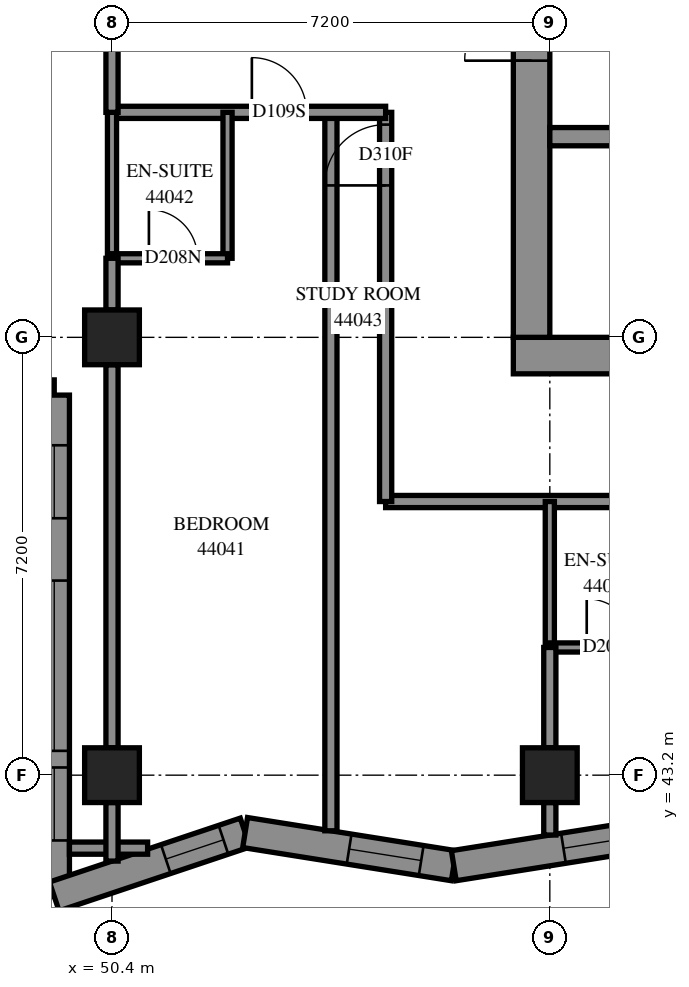
"""IFC4 building model, lengths in metres.
Left out: names, types, materials, properties, quantities, classifications, styles, units other than length and angle.
Written with IfcOpenShell. Run it as: python <this file> out.ifc"""

import sys

from ifc_helpers import new_model, si_unit, direction, frame, frame_2d, origin, origin_2d, place, context, subcontext, project, spatial, polyline, rectangle, outline, extrude, element, fill, save


model = new_model("IFC4")
c1 = context("Model", 3, precision=1e-05, world=origin(), true_north=direction((0.0, 1.0)))
c2 = subcontext(c1, "Body", "Model", "MODEL_VIEW")
j1 = project(units=[si_unit("LENGTHUNIT", "METRE"), si_unit("PLANEANGLEUNIT", "RADIAN")], contexts=[c1])
p1 = place(None, origin())
s1 = spatial("IfcSite", under=j1, at=p1, CompositionType="ELEMENT")
p2 = place(p1, origin())
s2 = spatial("IfcBuilding", under=s1, at=p2, CompositionType="ELEMENT")
p3 = place(p2, frame((0.0, 0.0, 162.6)))
s3 = spatial("IfcBuildingStorey", under=s2, at=p3, CompositionType="ELEMENT", Elevation=162.6)
for number, where, z_axis, x_axis in (
    (1, (50.4, 43.2, 0.0), (0.0, 0.0, 1.0), (1.0, 0.0, 0.0)),
    (2, (50.4, 50.4, 0.0), (0.0, 0.0, 1.0), (1.0, 0.0, 0.0)),
    (3, (57.6, 43.2, 0.0), (0.0, 0.0, 1.0), (1.0, 0.0, 0.0)),
):
    element("IfcColumn", number, at=place(p3, frame(where, z_axis=z_axis, x_axis=x_axis)), inside=s3, PredefinedType="COLUMN", context=c2, shape_type="SweptSolid", body=[
        extrude(rectangle(XDim=0.9, YDim=0.9, at=origin_2d()), origin(), (0.0, 0.0, 1.0), 3.1),
    ])
p4 = place(p3, frame((57.0, 50.1, -0.3), z_axis=(0.0, 0.0, 1.0), x_axis=(1.0, 0.0, 0.0)))
e4 = element("IfcWall", 4, at=p4, inside=s3, PredefinedType="SHEAR", context=c2, shape_type="SweptSolid", body=[
    extrude(rectangle(XDim=15.6, YDim=0.6, at=frame_2d((7.8, 0.0))), origin(), (0.0, 0.0, 1.0), 2.7),
])
p5 = place(p3, frame((57.3, 50.4, -0.3), z_axis=(0.0, 0.0, 1.0), x_axis=(0.0, 1.0, 0.0)))
e5 = element("IfcWall", 5, at=p5, inside=s3, PredefinedType="SHEAR", context=c2, shape_type="SweptSolid", body=[
    extrude(rectangle(XDim=14.4, YDim=0.6, at=frame_2d((7.2, 0.0))), origin(), (0.0, 0.0, 1.0), 2.7),
])
p6 = place(p5, frame((4.55, 0.0, 0.3)))
e6 = element("IfcOpeningElement", 6, at=p6, cuts=e5, PredefinedType="OPENING", context=c2, shape_type="SweptSolid", body=[
    extrude(rectangle(XDim=1.1, YDim=2.1, at=frame_2d((0.55, 1.05))), frame((0.0, 0.31, 0.0), z_axis=(0.0, -1.0, 0.0), x_axis=(1.0, 0.0, 0.0)), (0.0, 0.0, 1.0), 0.62),
])
p7 = place(p5, frame((11.35, 0.0, 0.3)))
e7 = element("IfcOpeningElement", 7, at=p7, cuts=e5, PredefinedType="OPENING", context=c2, shape_type="SweptSolid", body=[
    extrude(rectangle(XDim=1.1, YDim=2.1, at=frame_2d((0.55, 1.05))), frame((0.0, 0.31, 0.0), z_axis=(0.0, -1.0, 0.0), x_axis=(1.0, 0.0, 0.0)), (0.0, 0.0, 1.0), 0.62),
])
p8 = place(p3, frame((57.6, 53.7, 0.0), z_axis=(0.0, 0.0, 1.0), x_axis=(1.0, 0.0, 0.0)))
e8 = element("IfcWall", 8, at=p8, inside=s3, PredefinedType="SOLIDWALL", context=c2, shape_type="SweptSolid", body=[
    extrude(rectangle(XDim=14.4, YDim=0.3, at=frame_2d((7.2, 0.0))), origin(), (0.0, 0.0, 1.0), 3.1),
])
p9 = place(p8, frame((1.35, 0.0, 0.0)))
e9 = element("IfcOpeningElement", 9, at=p9, cuts=e8, PredefinedType="OPENING", context=c2, shape_type="SweptSolid", body=[
    extrude(rectangle(XDim=0.9, YDim=2.1, at=frame_2d((0.45, 1.05))), frame((0.0, 0.16, 0.0), z_axis=(0.0, -1.0, 0.0), x_axis=(1.0, 0.0, 0.0)), (0.0, 0.0, 1.0), 0.32),
])
p10 = place(p8, frame((4.95, 0.0, 0.0)))
e10 = element("IfcOpeningElement", 10, at=p10, cuts=e8, PredefinedType="OPENING", context=c2, shape_type="SweptSolid", body=[
    extrude(rectangle(XDim=0.9, YDim=2.1, at=frame_2d((0.45, 1.05))), frame((0.0, 0.16, 0.0), z_axis=(0.0, -1.0, 0.0), x_axis=(1.0, 0.0, 0.0)), (0.0, 0.0, 1.0), 0.32),
])
p11 = place(p8, frame((8.55, 0.0, 0.0)))
e11 = element("IfcOpeningElement", 11, at=p11, cuts=e8, PredefinedType="OPENING", context=c2, shape_type="SweptSolid", body=[
    extrude(rectangle(XDim=0.9, YDim=2.1, at=frame_2d((0.45, 1.05))), frame((0.0, 0.16, 0.0), z_axis=(0.0, -1.0, 0.0), x_axis=(1.0, 0.0, 0.0)), (0.0, 0.0, 1.0), 0.32),
])
p12 = place(p8, frame((12.05, 0.0, 0.0)))
e12 = element("IfcOpeningElement", 12, at=p12, cuts=e8, PredefinedType="OPENING", context=c2, shape_type="SweptSolid", body=[
    extrude(rectangle(XDim=1.1, YDim=2.1, at=frame_2d((0.55, 1.05))), frame((0.0, 0.16, 0.0), z_axis=(0.0, -1.0, 0.0), x_axis=(1.0, 0.0, 0.0)), (0.0, 0.0, 1.0), 0.32),
])
p13 = place(p3, frame((42.25, 49.45, 0.0), z_axis=(0.0, 0.0, 1.0), x_axis=(1.0, 0.0, 0.0)))
e13 = element("IfcWall", 13, at=p13, inside=s3, PredefinedType="SOLIDWALL", context=c2, shape_type="SweptSolid", body=[
    extrude(outline(polyline([(-0.25, -0.25), (6.95, -0.25), (7.45, 0.25), (0.25, 0.25), (-0.25, -0.25)])), origin(), (0.0, 0.0, 1.0), 3.1),
])
p14 = place(p13, frame((1.35, 0.0, 0.45)))
e14 = element("IfcOpeningElement", 14, at=p14, cuts=e13, PredefinedType="OPENING", context=c2, shape_type="SweptSolid", body=[
    extrude(rectangle(XDim=2.8, YDim=2.5, at=frame_2d((1.4, 1.25))), frame((0.0, 0.26, 0.0), z_axis=(0.0, -1.0, 0.0), x_axis=(1.0, 0.0, 0.0)), (0.0, 0.0, 1.0), 0.52),
])
p15 = place(p13, frame((5.175, 0.0, 0.45)))
e15 = element("IfcOpeningElement", 15, at=p15, cuts=e13, PredefinedType="OPENING", context=c2, shape_type="SweptSolid", body=[
    extrude(rectangle(XDim=1.2, YDim=2.5, at=frame_2d((0.6, 1.25))), frame((0.0, 0.26, 0.0), z_axis=(0.0, -1.0, 0.0), x_axis=(1.0, 0.0, 0.0)), (0.0, 0.0, 1.0), 0.52),
])
p16 = place(p3, frame((49.45, 49.45, 0.0), z_axis=(0.0, 0.0, 1.0), x_axis=(0.0, -1.0, 0.0)))
e16 = element("IfcWall", 16, at=p16, inside=s3, PredefinedType="SOLIDWALL", context=c2, shape_type="SweptSolid", body=[
    extrude(outline(polyline([(0.25, -0.25), (8.592, -0.25), (7.897, 0.25), (-0.25, 0.25), (0.25, -0.25)])), origin(), (0.0, 0.0, 1.0), 3.1),
])
p17 = place(p16, frame((3.05, 0.0, 0.45)))
e17 = element("IfcOpeningElement", 17, at=p17, cuts=e16, PredefinedType="OPENING", context=c2, shape_type="SweptSolid", body=[
    extrude(rectangle(XDim=2.8, YDim=2.5, at=frame_2d((1.4, 1.25))), frame((0.0, 0.26, 0.0), z_axis=(0.0, -1.0, 0.0), x_axis=(1.0, 0.0, 0.0)), (0.0, 0.0, 1.0), 0.52),
])
p18 = place(p16, frame((0.825, 0.0, 0.45)))
e18 = element("IfcOpeningElement", 18, at=p18, cuts=e16, PredefinedType="OPENING", context=c2, shape_type="SweptSolid", body=[
    extrude(rectangle(XDim=1.2, YDim=2.5, at=frame_2d((0.6, 1.25))), frame((0.0, 0.26, 0.0), z_axis=(0.0, -1.0, 0.0), x_axis=(1.0, 0.0, 0.0)), (0.0, 0.0, 1.0), 0.52),
])
p19 = place(p16, frame((6.124, 0.0, 0.45)))
e19 = element("IfcOpeningElement", 19, at=p19, cuts=e16, PredefinedType="OPENING", context=c2, shape_type="SweptSolid", body=[
    extrude(rectangle(XDim=1.2, YDim=2.5, at=frame_2d((0.6, 1.25))), frame((0.0, 0.26, 0.0), z_axis=(0.0, -1.0, 0.0), x_axis=(1.0, 0.0, 0.0)), (0.0, 0.0, 1.0), 0.52),
])
p20 = place(p3, frame((49.45, 41.205, 0.0), z_axis=(0.0, 0.0, 1.0), x_axis=(0.9482534743, 0.3175143279, 0.0)))
e20 = element("IfcWall", 20, at=p20, inside=s3, PredefinedType="SOLIDWALL", context=c2, shape_type="SweptSolid", body=[
    extrude(outline(polyline([(-0.347, -0.25), (3.249, -0.25), (3.372, 0.25), (0.347, 0.25), (-0.347, -0.25)])), origin(), (0.0, 0.0, 1.0), 3.1),
])
p21 = place(p20, frame((1.935, 0.0, 0.45)))
e21 = element("IfcOpeningElement", 21, at=p21, cuts=e20, PredefinedType="OPENING", context=c2, shape_type="SweptSolid", body=[
    extrude(rectangle(XDim=1.0, YDim=2.5, at=frame_2d((0.5, 1.25))), frame((0.0, 0.26, 0.0), z_axis=(0.0, -1.0, 0.0), x_axis=(1.0, 0.0, 0.0)), (0.0, 0.0, 1.0), 0.52),
])
p22 = place(p3, frame((52.589, 42.257, 0.0), z_axis=(0.0, 0.0, 1.0), x_axis=(0.9876042465, -0.1569644935, 0.0)))
e22 = element("IfcWall", 22, at=p22, inside=s3, PredefinedType="SOLIDWALL", context=c2, shape_type="SweptSolid", body=[
    extrude(outline(polyline([(0.061, -0.25), (3.514, -0.25), (3.435, 0.25), (-0.061, 0.25), (0.061, -0.25)])), origin(), (0.0, 0.0, 1.0), 3.1),
])
p23 = place(p22, frame((1.732, 0.0, 0.45)))
e23 = element("IfcOpeningElement", 23, at=p23, cuts=e22, PredefinedType="OPENING", context=c2, shape_type="SweptSolid", body=[
    extrude(rectangle(XDim=1.2, YDim=2.5, at=frame_2d((0.6, 1.25))), frame((0.0, 0.26, 0.0), z_axis=(0.0, -1.0, 0.0), x_axis=(1.0, 0.0, 0.0)), (0.0, 0.0, 1.0), 0.52),
])
p24 = place(p3, frame((56.021, 41.711, 0.0), z_axis=(0.0, 0.0, 1.0), x_axis=(0.9876056196, 0.1569558544, 0.0)))
e24 = element("IfcWall", 24, at=p24, inside=s3, PredefinedType="SOLIDWALL", context=c2, shape_type="SweptSolid", body=[
    extrude(outline(polyline([(-0.04, -0.25), (3.413, -0.25), (3.493, 0.25), (0.04, 0.25), (-0.04, -0.25)])), origin(), (0.0, 0.0, 1.0), 3.1),
])
p25 = place(p24, frame((1.826, 0.0, 0.45)))
e25 = element("IfcOpeningElement", 25, at=p25, cuts=e24, PredefinedType="OPENING", context=c2, shape_type="SweptSolid", body=[
    extrude(rectangle(XDim=1.2, YDim=2.5, at=frame_2d((0.6, 1.25))), frame((0.0, 0.26, 0.0), z_axis=(0.0, -1.0, 0.0), x_axis=(1.0, 0.0, 0.0)), (0.0, 0.0, 1.0), 0.52),
])
p26 = place(p3, frame((54.9, 47.7, 0.0), z_axis=(0.0, 0.0, 1.0), x_axis=(1.0, 0.0, 0.0)))
e26 = element("IfcWall", 26, at=p26, inside=s3, PredefinedType="PARTITIONING", context=c2, shape_type="SweptSolid", body=[
    extrude(rectangle(XDim=19.326, YDim=0.2, at=frame_2d((9.663, 0.0))), origin(), (0.0, 0.0, 1.0), 3.1),
])
p27 = place(p26, frame((6.599, 0.0, 0.0)))
e27 = element("IfcOpeningElement", 27, at=p27, cuts=e26, PredefinedType="OPENING", context=c2, shape_type="SweptSolid", body=[
    extrude(rectangle(XDim=0.9, YDim=2.1, at=frame_2d((0.45, 1.05))), frame((0.0, 0.11, 0.0), z_axis=(0.0, -1.0, 0.0), x_axis=(1.0, 0.0, 0.0)), (0.0, 0.0, 1.0), 0.22),
])
p28 = place(p26, frame((13.799, 0.0, 0.0)))
e28 = element("IfcOpeningElement", 28, at=p28, cuts=e26, PredefinedType="OPENING", context=c2, shape_type="SweptSolid", body=[
    extrude(rectangle(XDim=0.9, YDim=2.1, at=frame_2d((0.45, 1.05))), frame((0.0, 0.11, 0.0), z_axis=(0.0, -1.0, 0.0), x_axis=(1.0, 0.0, 0.0)), (0.0, 0.0, 1.0), 0.22),
])
p29 = place(p3, frame((54.0, 42.285, 0.0), z_axis=(0.0, 0.0, 1.0), x_axis=(0.0, 1.0, 0.0)))
e29 = element("IfcWall", 29, at=p29, inside=s3, PredefinedType="PARTITIONING", context=c2, shape_type="SweptSolid", body=[
    extrude(rectangle(XDim=11.815, YDim=0.2, at=frame_2d((5.907, 0.0))), origin(), (0.0, 0.0, 1.0), 3.1),
])
p30 = place(p3, frame((54.9, 47.7, 0.0), z_axis=(0.0, 0.0, 1.0), x_axis=(0.0, 1.0, 0.0)))
e30 = element("IfcWall", 30, at=p30, inside=s3, PredefinedType="PARTITIONING", context=c2, shape_type="SweptSolid", body=[
    extrude(rectangle(XDim=6.4, YDim=0.2, at=frame_2d((3.2, 0.0))), origin(), (0.0, 0.0, 1.0), 3.1),
])
p31 = place(p30, frame((5.199, 0.0, 0.0)))
e31 = element("IfcOpeningElement", 31, at=p31, cuts=e30, PredefinedType="OPENING", context=c2, shape_type="SweptSolid", body=[
    extrude(rectangle(XDim=1.0, YDim=2.1, at=frame_2d((0.5, 1.05))), frame((0.0, 0.11, 0.0), z_axis=(0.0, -1.0, 0.0), x_axis=(1.0, 0.0, 0.0)), (0.0, 0.0, 1.0), 0.22),
])
p32 = place(p3, frame((50.4, 43.65, 0.0), z_axis=(0.0, 0.0, 1.0), x_axis=(0.0, 1.0, 0.0)))
e32 = element("IfcWall", 32, at=p32, inside=s3, PredefinedType="PARTITIONING", context=c2, shape_type="SweptSolid", body=[
    extrude(rectangle(XDim=6.3, YDim=0.2, at=frame_2d((3.15, 0.0))), origin(), (0.0, 0.0, 1.0), 2.6),
])
p33 = place(p3, frame((50.4, 54.1, 0.0), z_axis=(0.0, 0.0, 1.0), x_axis=(1.0, 0.0, 0.0)))
e33 = element("IfcWall", 33, at=p33, inside=s3, PredefinedType="PARTITIONING", context=c2, shape_type="SweptSolid", body=[
    extrude(rectangle(XDim=4.5, YDim=0.2, at=frame_2d((2.25, 0.0))), origin(), (0.0, 0.0, 1.0), 3.1),
])
p34 = place(p33, frame((2.3, 0.0, 0.0)))
e34 = element("IfcOpeningElement", 34, at=p34, cuts=e33, PredefinedType="OPENING", context=c2, shape_type="SweptSolid", body=[
    extrude(rectangle(XDim=0.9, YDim=2.1, at=frame_2d((0.45, 1.05))), frame((0.0, 0.11, 0.0), z_axis=(0.0, -1.0, 0.0), x_axis=(1.0, 0.0, 0.0)), (0.0, 0.0, 1.0), 0.22),
])
for number, where, z_axis, x_axis in (
    (35, (57.6, 45.3, 0.0), (0.0, 0.0, 1.0), (0.0, 1.0, 0.0)),
    (36, (52.3, 51.7, 0.0), (0.0, 0.0, 1.0), (0.0, 1.0, 0.0)),
    (37, (50.4, 51.7, 0.0), (0.0, 0.0, 1.0), (0.0, 1.0, 0.0)),
):
    element("IfcWall", number, at=place(p3, frame(where, z_axis=z_axis, x_axis=x_axis)), inside=s3, PredefinedType="PARTITIONING", context=c2, shape_type="SweptSolid", body=[
        extrude(rectangle(XDim=2.4, YDim=0.15, at=frame_2d((1.2, 0.0))), origin(), (0.0, 0.0, 1.0), 3.1),
    ])
p35 = place(p3, frame((50.4, 54.1, 0.0), z_axis=(0.0, 0.0, 1.0), x_axis=(0.0, 1.0, 0.0)))
e38 = element("IfcWall", 38, at=p35, inside=s3, PredefinedType="PARTITIONING", context=c2, shape_type="SweptSolid", body=[
    extrude(rectangle(XDim=2.2, YDim=0.2, at=frame_2d((1.1, 0.0))), origin(), (0.0, 0.0, 1.0), 3.1),
])
p36 = place(p3, frame((50.4, 51.7, 0.0), z_axis=(0.0, 0.0, 1.0), x_axis=(1.0, 0.0, 0.0)))
e39 = element("IfcWall", 39, at=p36, inside=s3, PredefinedType="PARTITIONING", context=c2, shape_type="SweptSolid", body=[
    extrude(rectangle(XDim=1.9, YDim=0.15, at=frame_2d((0.95, 0.0))), origin(), (0.0, 0.0, 1.0), 3.1),
])
p37 = place(p36, frame((0.607, 0.0, 0.0)))
e40 = element("IfcOpeningElement", 40, at=p37, cuts=e39, PredefinedType="OPENING", context=c2, shape_type="SweptSolid", body=[
    extrude(rectangle(XDim=0.8, YDim=2.1, at=frame_2d((0.4, 1.05))), frame((0.0, 0.085, 0.0), z_axis=(0.0, -1.0, 0.0), x_axis=(1.0, 0.0, 0.0)), (0.0, 0.0, 1.0), 0.17),
])
p38 = place(p3, frame((57.6, 45.3, 0.0), z_axis=(0.0, 0.0, 1.0), x_axis=(1.0, 0.0, 0.0)))
e41 = element("IfcWall", 41, at=p38, inside=s3, PredefinedType="PARTITIONING", context=c2, shape_type="SweptSolid", body=[
    extrude(rectangle(XDim=1.9, YDim=0.15, at=frame_2d((0.95, 0.0))), origin(), (0.0, 0.0, 1.0), 3.1),
])
p39 = place(p38, frame((0.607, 0.0, 0.0)))
e42 = element("IfcOpeningElement", 42, at=p39, cuts=e41, PredefinedType="OPENING", context=c2, shape_type="SweptSolid", body=[
    extrude(rectangle(XDim=0.8, YDim=2.1, at=frame_2d((0.4, 1.05))), frame((0.0, 0.085, 0.0), z_axis=(0.0, -1.0, 0.0), x_axis=(1.0, 0.0, 0.0)), (0.0, 0.0, 1.0), 0.17),
])
p40 = place(p3, frame((57.6, 43.65, 0.0), z_axis=(0.0, 0.0, 1.0), x_axis=(0.0, 1.0, 0.0)))
e43 = element("IfcWall", 43, at=p40, inside=s3, PredefinedType="PARTITIONING", context=c2, shape_type="SweptSolid", body=[
    extrude(rectangle(XDim=1.65, YDim=0.2, at=frame_2d((0.825, 0.0))), origin(), (0.0, 0.0, 1.0), 3.1),
])
p41 = place(p3, frame((49.7, 42.0, 0.0), z_axis=(0.0, 0.0, 1.0), x_axis=(1.0, 0.0, 0.0)))
e44 = element("IfcWall", 44, at=p41, inside=s3, PredefinedType="PARTITIONING", context=c2, shape_type="SweptSolid", body=[
    extrude(rectangle(XDim=1.286, YDim=0.2, at=frame_2d((0.643, 0.0))), origin(), (0.0, 0.0, 1.0), 3.1),
])
p42 = place(p3, frame((50.4, 50.85, 0.0), z_axis=(0.0, 0.0, 1.0), x_axis=(0.0, 1.0, 0.0)))
e45 = element("IfcWall", 45, at=p42, inside=s3, PredefinedType="PARTITIONING", context=c2, shape_type="SweptSolid", body=[
    extrude(rectangle(XDim=0.85, YDim=0.2, at=frame_2d((0.425, 0.0))), origin(), (0.0, 0.0, 1.0), 3.1),
])
p43 = place(p3, frame((50.4, 41.787, 0.0), z_axis=(0.0, 0.0, 1.0), x_axis=(0.0, 1.0, 0.0)))
e46 = element("IfcWall", 46, at=p43, inside=s3, PredefinedType="PARTITIONING", context=c2, shape_type="SweptSolid", body=[
    extrude(rectangle(XDim=0.963, YDim=0.2, at=frame_2d((0.481, 0.0))), origin(), (0.0, 0.0, 1.0), 3.1),
])
p44 = place(p3, frame((57.6, 42.215, 0.0), z_axis=(0.0, 0.0, 1.0), x_axis=(0.0, 1.0, 0.0)))
e47 = element("IfcWall", 47, at=p44, inside=s3, PredefinedType="PARTITIONING", context=c2, shape_type="SweptSolid", body=[
    extrude(rectangle(XDim=0.535, YDim=0.2, at=frame_2d((0.267, 0.0))), origin(), (0.0, 0.0, 1.0), 3.1),
])
p45 = place(p17, origin())
e48 = element("IfcWindow", 48, at=p45, inside=s3, PartitioningType="SINGLE_PANEL", PredefinedType="WINDOW", context=c2, shape_type="SweptSolid", body=[
    extrude(rectangle(XDim=2.8, YDim=2.5, at=frame_2d((1.4, 1.25))), frame((0.0, 0.18, 0.0), z_axis=(0.0, -1.0, 0.0), x_axis=(1.0, 0.0, 0.0)), (0.0, 0.0, 1.0), 0.06),
])
fill(e17, e48)
p46 = place(p18, origin())
e49 = element("IfcWindow", 49, at=p46, inside=s3, PartitioningType="SINGLE_PANEL", PredefinedType="WINDOW", context=c2, shape_type="SweptSolid", body=[
    extrude(rectangle(XDim=1.2, YDim=2.5, at=frame_2d((0.6, 1.25))), frame((0.0, 0.18, 0.0), z_axis=(0.0, -1.0, 0.0), x_axis=(1.0, 0.0, 0.0)), (0.0, 0.0, 1.0), 0.06),
])
fill(e18, e49)
p47 = place(p19, origin())
e50 = element("IfcWindow", 50, at=p47, inside=s3, PartitioningType="SINGLE_PANEL", PredefinedType="WINDOW", context=c2, shape_type="SweptSolid", body=[
    extrude(rectangle(XDim=1.2, YDim=2.5, at=frame_2d((0.6, 1.25))), frame((0.0, 0.18, 0.0), z_axis=(0.0, -1.0, 0.0), x_axis=(1.0, 0.0, 0.0)), (0.0, 0.0, 1.0), 0.06),
])
fill(e19, e50)
p48 = place(p23, origin())
e51 = element("IfcWindow", 51, at=p48, inside=s3, PartitioningType="SINGLE_PANEL", PredefinedType="WINDOW", context=c2, shape_type="SweptSolid", body=[
    extrude(rectangle(XDim=1.2, YDim=2.5, at=frame_2d((0.6, 1.25))), frame((0.0, 0.18, 0.0), z_axis=(0.0, -1.0, 0.0), x_axis=(1.0, 0.0, 0.0)), (0.0, 0.0, 1.0), 0.06),
])
fill(e23, e51)
p49 = place(p25, origin())
e52 = element("IfcWindow", 52, at=p49, inside=s3, PartitioningType="SINGLE_PANEL", PredefinedType="WINDOW", context=c2, shape_type="SweptSolid", body=[
    extrude(rectangle(XDim=1.2, YDim=2.5, at=frame_2d((0.6, 1.25))), frame((0.0, 0.18, 0.0), z_axis=(0.0, -1.0, 0.0), x_axis=(1.0, 0.0, 0.0)), (0.0, 0.0, 1.0), 0.06),
])
fill(e25, e52)
p50 = place(p6, origin())
e53 = element("IfcDoor", 53, at=p50, inside=s3, OperationType="DOUBLE_DOOR_SINGLE_SWING", PredefinedType="DOOR", context=c2, shape_type="SweptSolid", body=[
    extrude(rectangle(XDim=1.1, YDim=2.1, at=frame_2d((0.55, 1.05))), frame((0.0, 0.025, 0.0), z_axis=(0.0, -1.0, 0.0), x_axis=(1.0, 0.0, 0.0)), (0.0, 0.0, 1.0), 0.05),
])
fill(e6, e53)
p51 = place(p34, origin())
e54 = element("IfcDoor", 54, at=p51, inside=s3, OperationType="SINGLE_SWING_LEFT", PredefinedType="DOOR", context=c2, shape_type="SweptSolid", body=[
    extrude(rectangle(XDim=0.9, YDim=2.1, at=frame_2d((0.45, 1.05))), frame((0.0, 0.025, 0.0), z_axis=(0.0, -1.0, 0.0), x_axis=(1.0, 0.0, 0.0)), (0.0, 0.0, 1.0), 0.05),
])
fill(e34, e54)
p52 = place(p37, origin())
e55 = element("IfcDoor", 55, at=p52, inside=s3, OperationType="SINGLE_SWING_RIGHT", PredefinedType="DOOR", context=c2, shape_type="SweptSolid", body=[
    extrude(rectangle(XDim=0.8, YDim=2.1, at=frame_2d((0.4, 1.05))), frame((0.0, 0.025, 0.0), z_axis=(0.0, -1.0, 0.0), x_axis=(1.0, 0.0, 0.0)), (0.0, 0.0, 1.0), 0.05),
])
fill(e40, e55)
p53 = place(p31, origin())
e56 = element("IfcDoor", 56, at=p53, inside=s3, OperationType="SINGLE_SWING_RIGHT", PredefinedType="DOOR", context=c2, shape_type="SweptSolid", body=[
    extrude(rectangle(XDim=1.0, YDim=2.1, at=frame_2d((0.5, 1.05))), frame((0.0, 0.025, 0.0), z_axis=(0.0, -1.0, 0.0), x_axis=(1.0, 0.0, 0.0)), (0.0, 0.0, 1.0), 0.05),
])
fill(e31, e56)
p54 = place(p39, origin())
e57 = element("IfcDoor", 57, at=p54, inside=s3, OperationType="SINGLE_SWING_RIGHT", PredefinedType="DOOR", context=c2, shape_type="SweptSolid", body=[
    extrude(rectangle(XDim=0.8, YDim=2.1, at=frame_2d((0.4, 1.05))), frame((0.0, 0.025, 0.0), z_axis=(0.0, -1.0, 0.0), x_axis=(1.0, 0.0, 0.0)), (0.0, 0.0, 1.0), 0.05),
])
fill(e42, e57)
p55 = place(p21, origin())
e58 = element("IfcWindow", 58, at=p55, inside=s3, PartitioningType="SINGLE_PANEL", PredefinedType="WINDOW", context=c2, shape_type="SweptSolid", body=[
    extrude(rectangle(XDim=1.0, YDim=2.5, at=frame_2d((0.5, 1.25))), frame((0.0, 0.18, 0.0), z_axis=(0.0, -1.0, 0.0), x_axis=(1.0, 0.0, 0.0)), (0.0, 0.0, 1.0), 0.06),
])
fill(e21, e58)
save(model, sys.argv[1])
